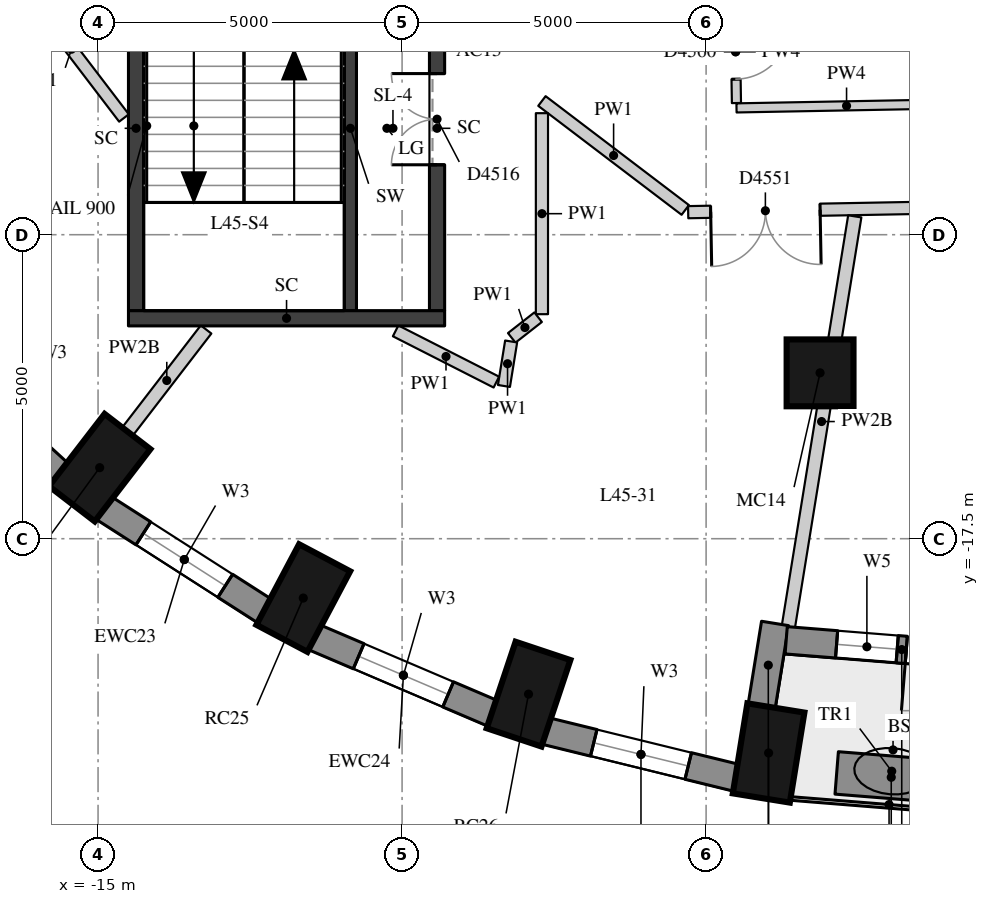
"""IFC4 building model, lengths in metres.
Left out: names, types, materials, properties, quantities, classifications, styles, units other than length and angle.
Written with IfcOpenShell. Run it as: python <this file> out.ifc"""

import sys

from ifc_helpers import new_model, si_unit, direction, frame, frame_2d, origin, origin_2d, place, context, subcontext, project, spatial, rectangle, extrude, element, fill, save


model = new_model("IFC4")
c1 = context("Model", 3, precision=1e-05, world=origin(), true_north=direction((0.0, 1.0)))
c2 = subcontext(c1, "Body", "Model", "MODEL_VIEW")
j1 = project(units=[si_unit("LENGTHUNIT", "METRE"), si_unit("PLANEANGLEUNIT", "RADIAN")], contexts=[c1])
p1 = place(None, origin())
s1 = spatial("IfcSite", under=j1, at=p1, CompositionType="ELEMENT")
p2 = place(p1, origin())
s2 = spatial("IfcBuilding", under=s1, at=p2, CompositionType="ELEMENT")
p3 = place(p2, frame((0.0, 0.0, 161.6)))
s3 = spatial("IfcBuildingStorey", under=s2, at=p3, CompositionType="ELEMENT", Elevation=161.6)
for number, where, z_axis, x_axis in (
    (1, (-14.973, -16.332, 0.0), (0.0, 0.0, 1.0), (-0.61, -0.792, 0.0)),
    (2, (-11.625, -18.476, 0.0), (0.0, 0.0, 1.0), (-0.468, -0.884, 0.0)),
    (3, (-7.92, -20.056, 0.0), (0.0, 0.0, 1.0), (-0.317, -0.949, 0.0)),
    (4, (-3.972, -21.024, 0.0), (0.0, 0.0, 1.0), (-0.16, -0.987, 0.0)),
):
    element("IfcColumn", number, at=place(p3, frame(where, z_axis=z_axis, x_axis=x_axis)), inside=s3, PredefinedType="COLUMN", context=c2, shape_type="SweptSolid", body=[
        extrude(rectangle(XDim=1.5, YDim=0.95, at=origin_2d()), origin(), (0.0, 0.0, 1.0), 3.3),
    ])
p4 = place(p3, frame((-3.126, -14.772, 0.0), z_axis=(0.0, 0.0, 1.0), x_axis=(1.0, 0.0, 0.0)))
e5 = element("IfcColumn", 5, at=p4, inside=s3, PredefinedType="COLUMN", context=c2, shape_type="SweptSolid", body=[
    extrude(rectangle(XDim=1.1, YDim=1.1, at=origin_2d()), origin(), (0.0, 0.0, 1.0), 3.3),
])
p5 = place(p3, frame((-17.913, -14.35, 0.0), z_axis=(0.0, 0.0, 1.0), x_axis=(0.737808755941, -0.675009807082, 0.0)))
e6 = element("IfcWall", 6, at=p5, inside=s3, PredefinedType="SOLIDWALL", context=c2, shape_type="SweptSolid", body=[
    extrude(rectangle(XDim=3.094, YDim=0.45, at=frame_2d((1.547, 0.0))), origin(), (0.0, 0.0, 1.0), 3.02),
])
p6 = place(p5, frame((0.747, 0.0, 0.4)))
e7 = element("IfcOpeningElement", 7, at=p6, cuts=e6, PredefinedType="OPENING", context=c2, shape_type="SweptSolid", body=[
    extrude(rectangle(XDim=1.6, YDim=1.75, at=frame_2d((0.8, 0.875))), frame((0.0, 0.235, 0.0), z_axis=(0.0, -1.0, 0.0), x_axis=(1.0, 0.0, 0.0)), (0.0, 0.0, 1.0), 0.47),
])
p7 = place(p3, frame((-14.908, -16.993, 0.0), z_axis=(0.0, 0.0, 1.0), x_axis=(0.842065914439, -0.539374633943, 0.0)))
e8 = element("IfcWall", 8, at=p7, inside=s3, PredefinedType="SOLIDWALL", context=c2, shape_type="SweptSolid", body=[
    extrude(rectangle(XDim=3.151, YDim=0.45, at=frame_2d((1.576, 0.0))), origin(), (0.0, 0.0, 1.0), 3.02),
])
p8 = place(p7, frame((0.776, 0.0, 0.4)))
e9 = element("IfcOpeningElement", 9, at=p8, cuts=e8, PredefinedType="OPENING", context=c2, shape_type="SweptSolid", body=[
    extrude(rectangle(XDim=1.6, YDim=1.75, at=frame_2d((0.8, 0.875))), frame((0.0, 0.235, 0.0), z_axis=(0.0, -1.0, 0.0), x_axis=(1.0, 0.0, 0.0)), (0.0, 0.0, 1.0), 0.47),
])
p9 = place(p3, frame((-11.45, -19.119, 0.0), z_axis=(0.0, 0.0, 1.0), x_axis=(0.919798725687, -0.392390499663, 0.0)))
e10 = element("IfcWall", 10, at=p9, inside=s3, PredefinedType="SOLIDWALL", context=c2, shape_type="SweptSolid", body=[
    extrude(rectangle(XDim=3.2, YDim=0.45, at=frame_2d((1.6, 0.0))), origin(), (0.0, 0.0, 1.0), 3.02),
])
p10 = place(p9, frame((0.8, 0.0, 0.4)))
e11 = element("IfcOpeningElement", 11, at=p10, cuts=e10, PredefinedType="OPENING", context=c2, shape_type="SweptSolid", body=[
    extrude(rectangle(XDim=1.6, YDim=1.75, at=frame_2d((0.8, 0.875))), frame((0.0, 0.235, 0.0), z_axis=(0.0, -1.0, 0.0), x_axis=(1.0, 0.0, 0.0)), (0.0, 0.0, 1.0), 0.47),
])
p11 = place(p3, frame((-7.643, -20.662, 0.0), z_axis=(0.0, 0.0, 1.0), x_axis=(0.971232901476, -0.238131583563, 0.0)))
e12 = element("IfcWall", 12, at=p11, inside=s3, PredefinedType="SOLIDWALL", context=c2, shape_type="SweptSolid", body=[
    extrude(rectangle(XDim=3.237, YDim=0.45, at=frame_2d((1.618, 0.0))), origin(), (0.0, 0.0, 1.0), 3.02),
])
p12 = place(p11, frame((0.818, 0.0, 0.4)))
e13 = element("IfcOpeningElement", 13, at=p12, cuts=e12, PredefinedType="OPENING", context=c2, shape_type="SweptSolid", body=[
    extrude(rectangle(XDim=1.6, YDim=1.75, at=frame_2d((0.8, 0.875))), frame((0.0, 0.235, 0.0), z_axis=(0.0, -1.0, 0.0), x_axis=(1.0, 0.0, 0.0)), (0.0, 0.0, 1.0), 0.47),
])
p13 = place(p3, frame((-4.088, -20.266, 0.0), z_axis=(0.0, 0.0, 1.0), x_axis=(0.159641024018, 0.98717513312, 0.0)))
e14 = element("IfcWall", 14, at=p13, inside=s3, PredefinedType="SOLIDWALL", context=c2, shape_type="SweptSolid", body=[
    extrude(rectangle(XDim=1.39, YDim=0.45, at=frame_2d((0.695, 0.0))), origin(), (0.0, 0.0, 1.0), 2.57),
])
p14 = place(p3, frame((-3.683, -19.171, 0.0), z_axis=(0.0, 0.0, 1.0), x_axis=(0.996792437449, -0.080030223316, 0.0)))
e15 = element("IfcWall", 15, at=p14, inside=s3, PredefinedType="SOLIDWALL", context=c2, shape_type="SweptSolid", body=[
    extrude(rectangle(XDim=3.813, YDim=0.45, at=frame_2d((1.907, 0.0))), origin(), (0.0, 0.0, 1.0), 3.02),
])
p15 = place(p14, frame((0.832, 0.0, 0.4)))
e16 = element("IfcOpeningElement", 16, at=p15, cuts=e15, PredefinedType="OPENING", context=c2, shape_type="SweptSolid", body=[
    extrude(rectangle(XDim=1.0, YDim=1.75, at=frame_2d((0.5, 0.875))), frame((0.0, 0.235, 0.0), z_axis=(0.0, -1.0, 0.0), x_axis=(1.0, 0.0, 0.0)), (0.0, 0.0, 1.0), 0.47),
])
p16 = place(p14, frame((1.982, 0.0, 0.0)))
e17 = element("IfcOpeningElement", 17, at=p16, cuts=e15, PredefinedType="OPENING", context=c2, shape_type="SweptSolid", body=[
    extrude(rectangle(XDim=1.0, YDim=2.15, at=frame_2d((0.5, 1.075))), frame((0.0, 0.235, 0.0), z_axis=(0.0, -1.0, 0.0), x_axis=(1.0, 0.0, 0.0)), (0.0, 0.0, 1.0), 0.47),
])
p17 = place(p3, frame((-2.852, -21.352, 0.0), z_axis=(0.0, 0.0, 1.0), x_axis=(0.996814415906, -0.07975600443, 0.0)))
e18 = element("IfcWall", 18, at=p17, inside=s3, PredefinedType="USERDEFINED", context=c2, shape_type="SweptSolid", body=[
    extrude(rectangle(XDim=1.8, YDim=0.7, at=frame_2d((0.9, 0.0))), origin(), (0.0, 0.0, 1.0), 0.75),
])
p18 = place(p3, frame((-10.85, -13.75, 0.0), z_axis=(0.0, 0.0, 1.0), x_axis=(0.0, 1.0, 0.0)))
e19 = element("IfcWall", 19, at=p18, inside=s3, PredefinedType="SHEAR", context=c2, shape_type="SweptSolid", body=[
    extrude(rectangle(XDim=6.0, YDim=0.2, at=frame_2d((3.0, 0.0))), origin(), (0.0, 0.0, 1.0), 3.02),
])
p19 = place(p18, frame((4.4, 0.0, 0.0)))
e20 = element("IfcOpeningElement", 20, at=p19, cuts=e19, PredefinedType="OPENING", context=c2, shape_type="SweptSolid", body=[
    extrude(rectangle(XDim=1.5, YDim=2.1, at=frame_2d((0.75, 1.05))), frame((0.0, 0.11, 0.0), z_axis=(0.0, -1.0, 0.0), x_axis=(1.0, 0.0, 0.0)), (0.0, 0.0, 1.0), 0.22),
])
p20 = place(p3, frame((-14.375, -13.75, -0.28), z_axis=(0.0, 0.0, 1.0), x_axis=(0.0, 1.0, 0.0)))
e21 = element("IfcWall", 21, at=p20, inside=s3, PredefinedType="SHEAR", context=c2, shape_type="SweptSolid", body=[
    extrude(rectangle(XDim=6.0, YDim=0.25, at=frame_2d((3.0, 0.0))), origin(), (0.0, 0.0, 1.0), 3.3),
])
p21 = place(p3, frame((-9.425, -13.75, -0.28), z_axis=(0.0, 0.0, 1.0), x_axis=(0.0, 1.0, 0.0)))
e22 = element("IfcWall", 22, at=p21, inside=s3, PredefinedType="SHEAR", context=c2, shape_type="SweptSolid", body=[
    extrude(rectangle(XDim=6.0, YDim=0.25, at=frame_2d((3.0, 0.0))), origin(), (0.0, 0.0, 1.0), 3.3),
])
p22 = place(p21, frame((2.4, 0.0, 0.28)))
e23 = element("IfcOpeningElement", 23, at=p22, cuts=e22, PredefinedType="OPENING", context=c2, shape_type="SweptSolid", body=[
    extrude(rectangle(XDim=1.5, YDim=2.1, at=frame_2d((0.75, 1.05))), frame((0.0, 0.135, 0.0), z_axis=(0.0, -1.0, 0.0), x_axis=(1.0, 0.0, 0.0)), (0.0, 0.0, 1.0), 0.27),
])
p23 = place(p3, frame((-14.5, -13.875, -0.28), z_axis=(0.0, 0.0, 1.0), x_axis=(1.0, 0.0, 0.0)))
e24 = element("IfcWall", 24, at=p23, inside=s3, PredefinedType="SHEAR", context=c2, shape_type="SweptSolid", body=[
    extrude(rectangle(XDim=5.2, YDim=0.25, at=frame_2d((2.6, 0.0))), origin(), (0.0, 0.0, 1.0), 3.3),
])
p24 = place(p3, frame((17.6, -11.702, 0.0), z_axis=(0.0, 0.0, 1.0), x_axis=(-0.999825923551, -0.018658043723, 0.0)))
e25 = element("IfcWall", 25, at=p24, inside=s3, PredefinedType="PARTITIONING", context=c2, shape_type="SweptSolid", body=[
    extrude(rectangle(XDim=22.899, YDim=0.2, at=frame_2d((11.449, 0.0))), origin(), (0.0, 0.0, 1.0), 3.02),
])
p25 = place(p24, frame((20.729, 0.0, 0.0)))
e26 = element("IfcOpeningElement", 26, at=p25, cuts=e25, PredefinedType="OPENING", context=c2, shape_type="SweptSolid", body=[
    extrude(rectangle(XDim=1.8, YDim=2.1, at=frame_2d((0.9, 1.05))), frame((0.0, 0.11, 0.0), z_axis=(0.0, -1.0, 0.0), x_axis=(1.0, 0.0, 0.0)), (0.0, 0.0, 1.0), 0.22),
])
p26 = place(p24, frame((14.554, 0.0, 0.0)))
e27 = element("IfcOpeningElement", 27, at=p26, cuts=e25, PredefinedType="OPENING", context=c2, shape_type="SweptSolid", body=[
    extrude(rectangle(XDim=1.1, YDim=2.1, at=frame_2d((0.55, 1.05))), frame((0.0, 0.11, 0.0), z_axis=(0.0, -1.0, 0.0), x_axis=(1.0, 0.0, 0.0)), (0.0, 0.0, 1.0), 0.22),
])
p27 = place(p24, frame((8.491, 0.0, 0.0)))
e28 = element("IfcOpeningElement", 28, at=p27, cuts=e25, PredefinedType="OPENING", context=c2, shape_type="SweptSolid", body=[
    extrude(rectangle(XDim=1.1, YDim=2.1, at=frame_2d((0.55, 1.05))), frame((0.0, 0.11, 0.0), z_axis=(0.0, -1.0, 0.0), x_axis=(1.0, 0.0, 0.0)), (0.0, 0.0, 1.0), 0.22),
])
p28 = place(p3, frame((-5.343, -12.093, 0.0), z_axis=(0.0, 0.0, 1.0), x_axis=(-0.796104996328, 0.605158520407, 0.0)))
e29 = element("IfcWall", 29, at=p28, inside=s3, PredefinedType="PARTITIONING", context=c2, shape_type="SweptSolid", body=[
    extrude(rectangle(XDim=2.961, YDim=0.2, at=frame_2d((1.48, 0.0))), origin(), (0.0, 0.0, 1.0), 3.02),
])
p29 = place(p3, frame((-7.7, -10.501, 0.0), z_axis=(0.0, 0.0, 1.0), x_axis=(0.0, -1.0, 0.0)))
e30 = element("IfcWall", 30, at=p29, inside=s3, PredefinedType="PARTITIONING", context=c2, shape_type="SweptSolid", body=[
    extrude(rectangle(XDim=3.306, YDim=0.2, at=frame_2d((1.653, 0.0))), origin(), (0.0, 0.0, 1.0), 3.02),
])
p30 = place(p3, frame((-7.762, -13.857, 0.0), z_axis=(0.0, 0.0, 1.0), x_axis=(-0.787561048704, -0.616236638447, 0.0)))
e31 = element("IfcWall", 31, at=p30, inside=s3, PredefinedType="PARTITIONING", context=c2, shape_type="SweptSolid", body=[
    extrude(rectangle(XDim=0.552, YDim=0.2, at=frame_2d((0.276, 0.0))), origin(), (0.0, 0.0, 1.0), 3.02),
])
p31 = place(p3, frame((-8.206, -14.256, 0.0), z_axis=(0.0, 0.0, 1.0), x_axis=(-0.159750207899, -0.987157470253, 0.0)))
e32 = element("IfcWall", 32, at=p31, inside=s3, PredefinedType="PARTITIONING", context=c2, shape_type="SweptSolid", body=[
    extrude(rectangle(XDim=0.741, YDim=0.2, at=frame_2d((0.371, 0.0))), origin(), (0.0, 0.0, 1.0), 3.02),
])
p32 = place(p3, frame((-8.449, -14.925, 0.0), z_axis=(0.0, 0.0, 1.0), x_axis=(-0.891172770552, 0.45366407509, 0.0)))
e33 = element("IfcWall", 33, at=p32, inside=s3, PredefinedType="PARTITIONING", context=c2, shape_type="SweptSolid", body=[
    extrude(rectangle(XDim=1.859, YDim=0.2, at=frame_2d((0.929, 0.0))), origin(), (0.0, 0.0, 1.0), 3.02),
])
p33 = place(p3, frame((-14.574, -10.58, 0.0), z_axis=(0.0, 0.0, 1.0), x_axis=(-0.606733250298, 0.794905505694, 0.0)))
e34 = element("IfcWall", 34, at=p33, inside=s3, PredefinedType="PARTITIONING", context=c2, shape_type="SweptSolid", body=[
    extrude(rectangle(XDim=2.845, YDim=0.2, at=frame_2d((1.423, 0.0))), origin(), (0.0, 0.0, 1.0), 3.02),
])
p34 = place(p33, frame((1.805, 0.0, 0.0)))
e35 = element("IfcOpeningElement", 35, at=p34, cuts=e34, PredefinedType="OPENING", context=c2, shape_type="SweptSolid", body=[
    extrude(rectangle(XDim=0.9, YDim=2.1, at=frame_2d((0.45, 1.05))), frame((0.0, 0.11, 0.0), z_axis=(0.0, -1.0, 0.0), x_axis=(1.0, 0.0, 0.0)), (0.0, 0.0, 1.0), 0.22),
])
p35 = place(p3, frame((-0.88, -10.347, 0.0), z_axis=(0.0, 0.0, 1.0), x_axis=(-0.999826791681, -0.018611465199, 0.0)))
e36 = element("IfcWall", 36, at=p35, inside=s3, PredefinedType="PARTITIONING", context=c2, shape_type="SweptSolid", body=[
    extrude(rectangle(XDim=3.621, YDim=0.15, at=frame_2d((1.81, 0.0))), origin(), (0.0, 0.0, 1.0), 3.02),
])
p36 = place(p3, frame((-4.501, -10.334, 0.0), z_axis=(0.0, 0.0, 1.0), x_axis=(-0.015785981736, 0.999875393627, 0.0)))
e37 = element("IfcWall", 37, at=p36, inside=s3, PredefinedType="PARTITIONING", context=c2, shape_type="SweptSolid", body=[
    extrude(rectangle(XDim=1.686, YDim=0.15, at=frame_2d((0.843, 0.0))), origin(), (0.0, 0.0, 1.0), 3.02),
])
p37 = place(p36, frame((0.393, 0.0, 0.0)))
e38 = element("IfcOpeningElement", 38, at=p37, cuts=e37, PredefinedType="OPENING", context=c2, shape_type="SweptSolid", body=[
    extrude(rectangle(XDim=0.9, YDim=2.1, at=frame_2d((0.45, 1.05))), frame((0.0, 0.085, 0.0), z_axis=(0.0, -1.0, 0.0), x_axis=(1.0, 0.0, 0.0)), (0.0, 0.0, 1.0), 0.17),
])
p38 = place(p3, frame((-14.516, -15.737, 0.0), z_axis=(0.0, 0.0, 1.0), x_axis=(0.609983624648, 0.792414019097, 0.0)))
e39 = element("IfcWall", 39, at=p38, inside=s3, PredefinedType="PARTITIONING", context=c2, shape_type="SweptSolid", body=[
    extrude(rectangle(XDim=2.118, YDim=0.22, at=frame_2d((1.059, 0.0))), origin(), (0.0, 0.0, 1.0), 2.57),
])
p39 = place(p3, frame((-3.647, -18.948, 0.0), z_axis=(0.0, 0.0, 1.0), x_axis=(0.159718523375, 0.98716259719, 0.0)))
e40 = element("IfcWall", 40, at=p39, inside=s3, PredefinedType="PARTITIONING", context=c2, shape_type="SweptSolid", body=[
    extrude(rectangle(XDim=6.837, YDim=0.22, at=frame_2d((3.419, 0.0))), origin(), (0.0, 0.0, 1.0), 2.57),
])
p40 = place(p8, origin())
e41 = element("IfcWindow", 41, at=p40, inside=s3, PartitioningType="SINGLE_PANEL", PredefinedType="WINDOW", context=c2, shape_type="SweptSolid", body=[
    extrude(rectangle(XDim=1.6, YDim=1.75, at=frame_2d((0.8, 0.875))), frame((0.0, 0.035, 0.0), z_axis=(0.0, -1.0, 0.0), x_axis=(1.0, 0.0, 0.0)), (0.0, 0.0, 1.0), 0.06),
])
fill(e9, e41)
p41 = place(p10, origin())
e42 = element("IfcWindow", 42, at=p41, inside=s3, PartitioningType="SINGLE_PANEL", PredefinedType="WINDOW", context=c2, shape_type="SweptSolid", body=[
    extrude(rectangle(XDim=1.6, YDim=1.75, at=frame_2d((0.8, 0.875))), frame((0.0, 0.035, 0.0), z_axis=(0.0, -1.0, 0.0), x_axis=(1.0, 0.0, 0.0)), (0.0, 0.0, 1.0), 0.06),
])
fill(e11, e42)
p42 = place(p12, origin())
e43 = element("IfcWindow", 43, at=p42, inside=s3, PartitioningType="SINGLE_PANEL", PredefinedType="WINDOW", context=c2, shape_type="SweptSolid", body=[
    extrude(rectangle(XDim=1.6, YDim=1.75, at=frame_2d((0.8, 0.875))), frame((0.0, 0.035, 0.0), z_axis=(0.0, -1.0, 0.0), x_axis=(1.0, 0.0, 0.0)), (0.0, 0.0, 1.0), 0.06),
])
fill(e13, e43)
p43 = place(p15, origin())
e44 = element("IfcWindow", 44, at=p43, inside=s3, PartitioningType="SINGLE_PANEL", PredefinedType="WINDOW", context=c2, shape_type="SweptSolid", body=[
    extrude(rectangle(XDim=1.0, YDim=1.75, at=frame_2d((0.5, 0.875))), frame((0.0, 0.035, 0.0), z_axis=(0.0, -1.0, 0.0), x_axis=(1.0, 0.0, 0.0)), (0.0, 0.0, 1.0), 0.06),
])
fill(e16, e44)
p44 = place(p16, frame((1.0, 0.0, 0.0), z_axis=(0.0, 0.0, 1.0), x_axis=(-1.0, 0.0, 0.0)))
e45 = element("IfcDoor", 45, at=p44, inside=s3, OperationType="SINGLE_SWING_RIGHT", PredefinedType="DOOR", context=c2, shape_type="SweptSolid", body=[
    extrude(rectangle(XDim=1.0, YDim=2.15, at=frame_2d((0.5, 1.075))), frame((0.0, 0.075, 0.0), z_axis=(0.0, -1.0, 0.0), x_axis=(1.0, 0.0, 0.0)), (0.0, 0.0, 1.0), 0.05),
])
fill(e17, e45)
p45 = place(p22, origin())
e46 = element("IfcDoor", 46, at=p45, inside=s3, OperationType="DOUBLE_DOOR_SINGLE_SWING", PredefinedType="DOOR", context=c2, shape_type="SweptSolid", body=[
    extrude(rectangle(XDim=1.5, YDim=2.1, at=frame_2d((0.75, 1.05))), frame((0.0, 0.025, 0.0), z_axis=(0.0, -1.0, 0.0), x_axis=(1.0, 0.0, 0.0)), (0.0, 0.0, 1.0), 0.05),
])
fill(e23, e46)
p46 = place(p25, origin())
e47 = element("IfcDoor", 47, at=p46, inside=s3, OperationType="DOUBLE_DOOR_SINGLE_SWING", PredefinedType="DOOR", context=c2, shape_type="SweptSolid", body=[
    extrude(rectangle(XDim=1.8, YDim=2.1, at=frame_2d((0.9, 1.05))), frame((0.0, 0.025, 0.0), z_axis=(0.0, -1.0, 0.0), x_axis=(1.0, 0.0, 0.0)), (0.0, 0.0, 1.0), 0.05),
])
fill(e26, e47)
p47 = place(p37, origin())
e48 = element("IfcDoor", 48, at=p47, inside=s3, OperationType="SINGLE_SWING_LEFT", PredefinedType="DOOR", context=c2, shape_type="SweptSolid", body=[
    extrude(rectangle(XDim=0.9, YDim=2.1, at=frame_2d((0.45, 1.05))), frame((0.0, 0.025, 0.0), z_axis=(0.0, -1.0, 0.0), x_axis=(1.0, 0.0, 0.0)), (0.0, 0.0, 1.0), 0.05),
])
fill(e38, e48)
save(model, sys.argv[1])
